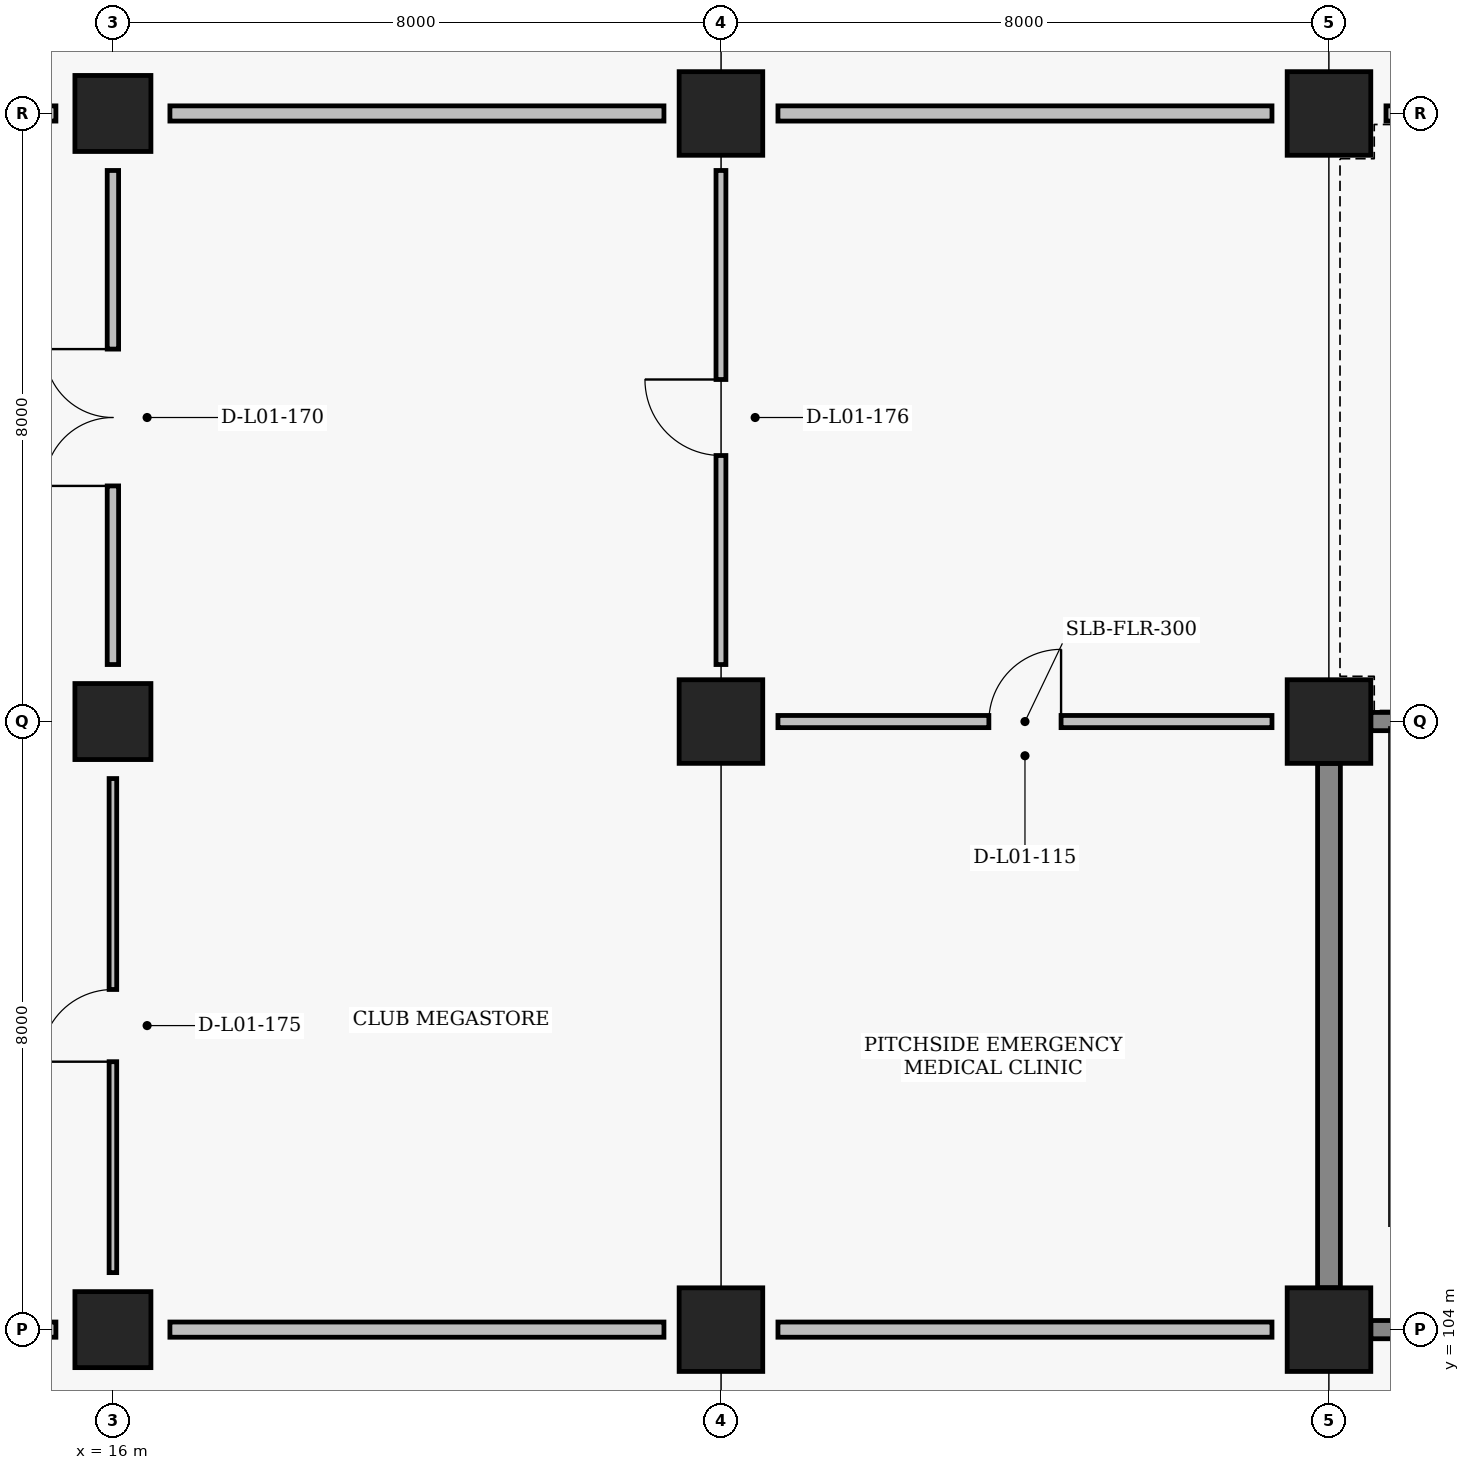
"""IFC4 building model, lengths in metres.
Left out: names, types, materials, properties, quantities, classifications, styles, units other than length and angle.
Written with IfcOpenShell. Run it as: python <this file> out.ifc"""

import sys

from ifc_helpers import new_model, si_unit, direction, frame, frame_2d, origin, origin_2d, place, context, subcontext, project, spatial, rectangle, circle, extrude, element, fill, save


model = new_model("IFC4")
c1 = context("Model", 3, precision=1e-05, world=origin(), true_north=direction((0.0, 1.0)))
c2 = subcontext(c1, "Body", "Model", "MODEL_VIEW")
j1 = project(units=[si_unit("LENGTHUNIT", "METRE"), si_unit("PLANEANGLEUNIT", "RADIAN")], contexts=[c1])
p1 = place(None, origin())
s1 = spatial("IfcSite", under=j1, at=p1, CompositionType="ELEMENT")
p2 = place(p1, origin())
s2 = spatial("IfcBuilding", under=s1, at=p2, CompositionType="ELEMENT")
p3 = place(p2, origin())
s3 = spatial("IfcBuildingStorey", under=s2, at=p3, CompositionType="ELEMENT", Elevation=0.0)
for number, where, z_axis, x_axis in (
    (1, (16.0, 104.0, 0.0), (0.0, 0.0, 1.0), (1.0, 0.0, 0.0)),
    (2, (16.0, 112.0, 0.0), (0.0, 0.0, 1.0), (1.0, 0.0, 0.0)),
    (3, (16.0, 120.0, 0.0), (0.0, 0.0, 1.0), (1.0, 0.0, 0.0)),
):
    element("IfcColumn", number, at=place(p3, frame(where, z_axis=z_axis, x_axis=x_axis)), inside=s3, PredefinedType="COLUMN", context=c2, shape_type="SweptSolid", body=[
        extrude(circle(Radius=0.5, at=origin_2d()), origin(), (0.0, 0.0, 1.0), 4.8),
    ])
for number, where, z_axis, x_axis in (
    (4, (24.0, 104.0, 0.0), (0.0, 0.0, 1.0), (1.0, 0.0, 0.0)),
    (5, (24.0, 112.0, 0.0), (0.0, 0.0, 1.0), (1.0, 0.0, 0.0)),
    (6, (24.0, 120.0, 0.0), (0.0, 0.0, 1.0), (1.0, 0.0, 0.0)),
    (7, (32.0, 104.0, 0.0), (0.0, 0.0, 1.0), (1.0, 0.0, 0.0)),
    (8, (32.0, 112.0, 0.0), (0.0, 0.0, 1.0), (1.0, 0.0, 0.0)),
    (9, (32.0, 120.0, 0.0), (0.0, 0.0, 1.0), (1.0, 0.0, 0.0)),
):
    element("IfcColumn", number, at=place(p3, frame(where, z_axis=z_axis, x_axis=x_axis)), inside=s3, PredefinedType="COLUMN", context=c2, shape_type="SweptSolid", body=[
        extrude(rectangle(XDim=1.1, YDim=1.1, at=origin_2d()), origin(), (0.0, 0.0, 1.0), 4.8),
    ])
p4 = place(p3, frame((32.55, 104.0, 0.0), z_axis=(0.0, 0.0, 1.0), x_axis=(1.0, 0.0, 0.0)))
e10 = element("IfcWall", 10, at=p4, inside=s3, PredefinedType="SHEAR", context=c2, shape_type="SweptSolid", body=[
    extrude(rectangle(XDim=6.9, YDim=0.24, at=frame_2d((3.45, 0.0))), origin(), (0.0, 0.0, 1.0), 3.77),
])
p5 = place(p4, frame((4.75, 0.0, 0.0)))
e11 = element("IfcOpeningElement", 11, at=p5, cuts=e10, PredefinedType="OPENING", context=c2, shape_type="SweptSolid", body=[
    extrude(rectangle(XDim=1.1, YDim=2.2, at=frame_2d((0.55, 1.1))), frame((0.0, 0.13, 0.0), z_axis=(0.0, -1.0, 0.0), x_axis=(1.0, 0.0, 0.0)), (0.0, 0.0, 1.0), 0.26),
])
p6 = place(p3, frame((32.55, 112.0, 0.0), z_axis=(0.0, 0.0, 1.0), x_axis=(1.0, 0.0, 0.0)))
e12 = element("IfcWall", 12, at=p6, inside=s3, PredefinedType="SHEAR", context=c2, shape_type="SweptSolid", body=[
    extrude(rectangle(XDim=6.9, YDim=0.24, at=frame_2d((3.45, 0.0))), origin(), (0.0, 0.0, 1.0), 3.77),
])
p7 = place(p3, frame((32.0, 104.55, 0.0), z_axis=(0.0, 0.0, 1.0), x_axis=(0.0, 1.0, 0.0)))
e13 = element("IfcWall", 13, at=p7, inside=s3, PredefinedType="SHEAR", context=c2, shape_type="SweptSolid", body=[
    extrude(rectangle(XDim=6.9, YDim=0.3, at=frame_2d((3.45, 0.0))), origin(), (0.0, 0.0, 1.0), 3.77),
])
for number, where, z_axis, x_axis in (
    (14, (8.75, 120.0, 0.0), (0.0, 0.0, 1.0), (1.0, 0.0, 0.0)),
    (15, (16.75, 120.0, 0.0), (0.0, 0.0, 1.0), (1.0, 0.0, 0.0)),
):
    element("IfcWall", number, at=place(p3, frame(where, z_axis=z_axis, x_axis=x_axis)), inside=s3, PredefinedType="PARTITIONING", context=c2, shape_type="SweptSolid", body=[
        extrude(rectangle(XDim=6.5, YDim=0.2, at=frame_2d((3.25, 0.0))), origin(), (0.0, 0.0, 1.0), 3.91),
    ])
for number, where, z_axis, x_axis in (
    (16, (24.75, 120.0, 0.0), (0.0, 0.0, 1.0), (1.0, 0.0, 0.0)),
    (17, (32.75, 120.0, 0.0), (0.0, 0.0, 1.0), (1.0, 0.0, 0.0)),
):
    element("IfcWall", number, at=place(p3, frame(where, z_axis=z_axis, x_axis=x_axis)), inside=s3, PredefinedType="PARTITIONING", context=c2, shape_type="SweptSolid", body=[
        extrude(rectangle(XDim=6.5, YDim=0.2, at=frame_2d((3.25, 0.0))), origin(), (0.0, 0.0, 1.0), 3.87),
    ])
p8 = place(p3, frame((8.75, 104.0, 0.0), z_axis=(0.0, 0.0, 1.0), x_axis=(1.0, 0.0, 0.0)))
e18 = element("IfcWall", 18, at=p8, inside=s3, PredefinedType="PARTITIONING", context=c2, shape_type="SweptSolid", body=[
    extrude(rectangle(XDim=6.5, YDim=0.2, at=frame_2d((3.25, 0.0))), origin(), (0.0, 0.0, 1.0), 3.91),
])
p9 = place(p3, frame((16.75, 104.0, 0.0), z_axis=(0.0, 0.0, 1.0), x_axis=(1.0, 0.0, 0.0)))
e19 = element("IfcWall", 19, at=p9, inside=s3, PredefinedType="PARTITIONING", context=c2, shape_type="SweptSolid", body=[
    extrude(rectangle(XDim=6.5, YDim=0.2, at=frame_2d((3.25, 0.0))), origin(), (0.0, 0.0, 1.0), 3.66),
])
p10 = place(p3, frame((24.75, 104.0, 0.0), z_axis=(0.0, 0.0, 1.0), x_axis=(1.0, 0.0, 0.0)))
e20 = element("IfcWall", 20, at=p10, inside=s3, PredefinedType="PARTITIONING", context=c2, shape_type="SweptSolid", body=[
    extrude(rectangle(XDim=6.5, YDim=0.2, at=frame_2d((3.25, 0.0))), origin(), (0.0, 0.0, 1.0), 3.87),
])
p11 = place(p3, frame((24.75, 112.0, 0.0), z_axis=(0.0, 0.0, 1.0), x_axis=(1.0, 0.0, 0.0)))
e21 = element("IfcWall", 21, at=p11, inside=s3, PredefinedType="PARTITIONING", context=c2, shape_type="SweptSolid", body=[
    extrude(rectangle(XDim=6.5, YDim=0.16, at=frame_2d((3.25, 0.0))), origin(), (0.0, 0.0, 1.0), 3.87),
])
p12 = place(p11, frame((2.775, 0.0, 0.0)))
e22 = element("IfcOpeningElement", 22, at=p12, cuts=e21, PredefinedType="OPENING", context=c2, shape_type="SweptSolid", body=[
    extrude(rectangle(XDim=0.95, YDim=2.1, at=frame_2d((0.475, 1.05))), frame((0.0, 0.09, 0.0), z_axis=(0.0, -1.0, 0.0), x_axis=(1.0, 0.0, 0.0)), (0.0, 0.0, 1.0), 0.18),
])
p13 = place(p3, frame((16.0, 112.75, 0.0), z_axis=(0.0, 0.0, 1.0), x_axis=(0.0, 1.0, 0.0)))
e23 = element("IfcWall", 23, at=p13, inside=s3, PredefinedType="PARTITIONING", context=c2, shape_type="SweptSolid", body=[
    extrude(rectangle(XDim=6.5, YDim=0.15, at=frame_2d((3.25, 0.0))), origin(), (0.0, 0.0, 1.0), 3.81),
])
p14 = place(p13, frame((2.35, 0.0, 0.0)))
e24 = element("IfcOpeningElement", 24, at=p14, cuts=e23, PredefinedType="OPENING", context=c2, shape_type="SweptSolid", body=[
    extrude(rectangle(XDim=1.8, YDim=2.3, at=frame_2d((0.9, 1.15))), frame((0.0, 0.085, 0.0), z_axis=(0.0, -1.0, 0.0), x_axis=(1.0, 0.0, 0.0)), (0.0, 0.0, 1.0), 0.17),
])
p15 = place(p3, frame((16.0, 104.75, 0.0), z_axis=(0.0, 0.0, 1.0), x_axis=(0.0, 1.0, 0.0)))
e25 = element("IfcWall", 25, at=p15, inside=s3, PredefinedType="PARTITIONING", context=c2, shape_type="SweptSolid", body=[
    extrude(rectangle(XDim=6.5, YDim=0.1, at=frame_2d((3.25, 0.0))), origin(), (0.0, 0.0, 1.0), 3.81),
])
p16 = place(p15, frame((2.775, 0.0, 0.0)))
e26 = element("IfcOpeningElement", 26, at=p16, cuts=e25, PredefinedType="OPENING", context=c2, shape_type="SweptSolid", body=[
    extrude(rectangle(XDim=0.95, YDim=2.1, at=frame_2d((0.475, 1.05))), frame((0.0, 0.06, 0.0), z_axis=(0.0, -1.0, 0.0), x_axis=(1.0, 0.0, 0.0)), (0.0, 0.0, 1.0), 0.12),
])
p17 = place(p3, frame((24.0, 112.75, 0.0), z_axis=(0.0, 0.0, 1.0), x_axis=(0.0, 1.0, 0.0)))
e27 = element("IfcWall", 27, at=p17, inside=s3, PredefinedType="PARTITIONING", context=c2, shape_type="SweptSolid", body=[
    extrude(rectangle(XDim=6.5, YDim=0.13, at=frame_2d((3.25, 0.0))), origin(), (0.0, 0.0, 1.0), 3.77),
])
p18 = place(p17, frame((2.75, 0.0, 0.0)))
e28 = element("IfcOpeningElement", 28, at=p18, cuts=e27, PredefinedType="OPENING", context=c2, shape_type="SweptSolid", body=[
    extrude(rectangle(XDim=1.0, YDim=2.1, at=frame_2d((0.5, 1.05))), frame((0.0, 0.075, 0.0), z_axis=(0.0, -1.0, 0.0), x_axis=(1.0, 0.0, 0.0)), (0.0, 0.0, 1.0), 0.15),
])
p19 = place(p12, origin())
e29 = element("IfcDoor", 29, at=p19, inside=s3, OperationType="SINGLE_SWING_RIGHT", PredefinedType="DOOR", context=c2, shape_type="SweptSolid", body=[
    extrude(rectangle(XDim=0.95, YDim=2.1, at=frame_2d((0.475, 1.05))), frame((0.0, 0.025, 0.0), z_axis=(0.0, -1.0, 0.0), x_axis=(1.0, 0.0, 0.0)), (0.0, 0.0, 1.0), 0.05),
])
fill(e22, e29)
p20 = place(p14, origin())
e30 = element("IfcDoor", 30, at=p20, inside=s3, OperationType="DOUBLE_SWING_LEFT", PredefinedType="DOOR", context=c2, shape_type="SweptSolid", body=[
    extrude(rectangle(XDim=1.8, YDim=2.3, at=frame_2d((0.9, 1.15))), frame((0.0, 0.025, 0.0), z_axis=(0.0, -1.0, 0.0), x_axis=(1.0, 0.0, 0.0)), (0.0, 0.0, 1.0), 0.05),
])
fill(e24, e30)
p21 = place(p16, origin())
e31 = element("IfcDoor", 31, at=p21, inside=s3, OperationType="SINGLE_SWING_LEFT", PredefinedType="DOOR", context=c2, shape_type="SweptSolid", body=[
    extrude(rectangle(XDim=0.95, YDim=2.1, at=frame_2d((0.475, 1.05))), frame((0.0, 0.025, 0.0), z_axis=(0.0, -1.0, 0.0), x_axis=(1.0, 0.0, 0.0)), (0.0, 0.0, 1.0), 0.05),
])
fill(e26, e31)
p22 = place(p18, origin())
e32 = element("IfcDoor", 32, at=p22, inside=s3, OperationType="SINGLE_SWING_RIGHT", PredefinedType="DOOR", context=c2, shape_type="SweptSolid", body=[
    extrude(rectangle(XDim=1.0, YDim=2.1, at=frame_2d((0.5, 1.05))), frame((0.0, 0.025, 0.0), z_axis=(0.0, -1.0, 0.0), x_axis=(1.0, 0.0, 0.0)), (0.0, 0.0, 1.0), 0.05),
])
fill(e28, e32)
save(model, sys.argv[1])
